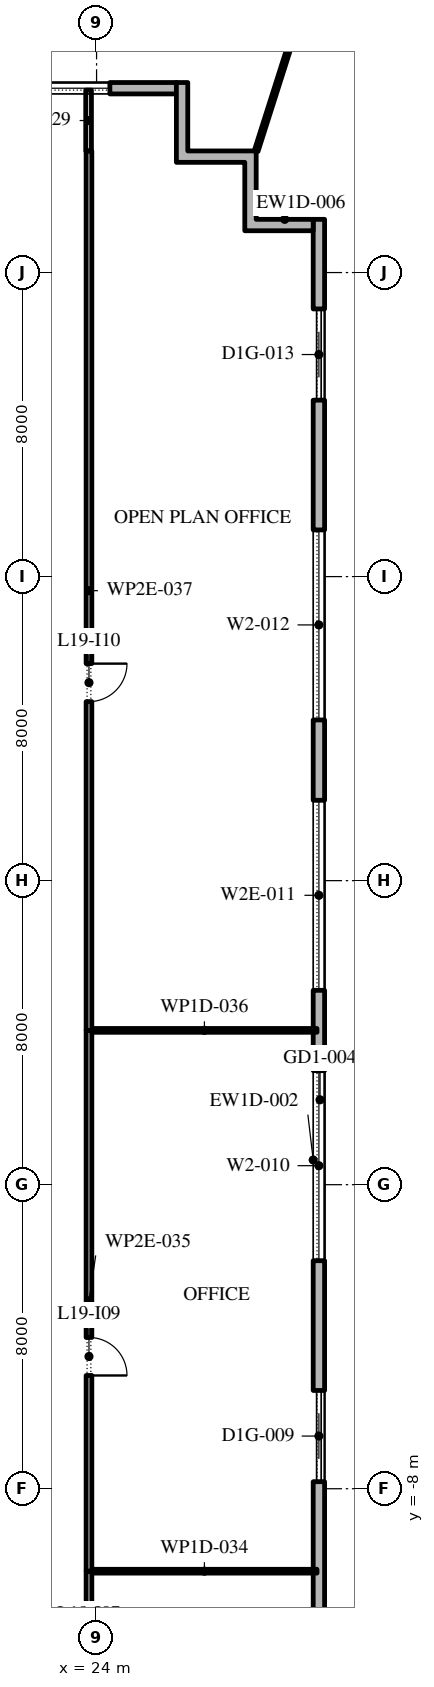
"""IFC4 building model, lengths in metres.
Left out: names, types, materials, properties, quantities, classifications, styles, units other than length and angle.
Written with IfcOpenShell. Run it as: python <this file> out.ifc"""

import sys

from ifc_helpers import new_model, si_unit, direction, frame, frame_2d, origin, place, context, subcontext, project, spatial, polyline, rectangle, outline, extrude, element, fill, save


model = new_model("IFC4")
c1 = context("Model", 3, precision=1e-05, world=origin(), true_north=direction((0.0, 1.0)))
c2 = subcontext(c1, "Body", "Model", "MODEL_VIEW")
j1 = project(units=[si_unit("LENGTHUNIT", "METRE"), si_unit("PLANEANGLEUNIT", "RADIAN")], contexts=[c1])
p1 = place(None, origin())
s1 = spatial("IfcSite", under=j1, at=p1, CompositionType="ELEMENT")
p2 = place(p1, origin())
s2 = spatial("IfcBuilding", under=s1, at=p2, CompositionType="ELEMENT")
p3 = place(p2, frame((0.0, 0.0, 90.0)))
s3 = spatial("IfcBuildingStorey", under=s2, at=p3, CompositionType="ELEMENT", Elevation=90.0)
p4 = place(p3, frame((29.85, -24.1, 0.0), z_axis=(0.0, 0.0, 1.0), x_axis=(0.0, 1.0, 0.0)))
e1 = element("IfcWall", 1, at=p4, inside=s3, PredefinedType="STANDARD", context=c2, shape_type="SweptSolid", body=[
    extrude(rectangle(XDim=49.5, YDim=0.3, at=frame_2d((24.75, 0.0))), origin(), (0.0, 0.0, 1.0), 3.9),
])
p5 = place(p4, frame((0.907, 0.0, 0.45)))
e2 = element("IfcOpeningElement", 2, at=p5, cuts=e1, PredefinedType="OPENING", context=c2, shape_type="SweptSolid", body=[
    extrude(rectangle(XDim=5.0, YDim=3.25, at=frame_2d((2.5, 1.625))), frame((0.0, 0.16, 0.0), z_axis=(0.0, -1.0, 0.0), x_axis=(1.0, 0.0, 0.0)), (0.0, 0.0, 1.0), 0.32),
])
p6 = place(p4, frame((7.871, 0.0, 0.45)))
e3 = element("IfcOpeningElement", 3, at=p6, cuts=e1, PredefinedType="OPENING", context=c2, shape_type="SweptSolid", body=[
    extrude(rectangle(XDim=5.0, YDim=2.725, at=frame_2d((2.5, 1.363))), frame((0.0, 0.16, 0.0), z_axis=(0.0, -1.0, 0.0), x_axis=(1.0, 0.0, 0.0)), (0.0, 0.0, 1.0), 0.32),
])
p7 = place(p4, frame((16.286, 0.0, 0.0)))
e4 = element("IfcOpeningElement", 4, at=p7, cuts=e1, PredefinedType="OPENING", context=c2, shape_type="SweptSolid", body=[
    extrude(rectangle(XDim=2.4, YDim=3.225, at=frame_2d((1.2, 1.613))), frame((0.0, 0.16, 0.0), z_axis=(0.0, -1.0, 0.0), x_axis=(1.0, 0.0, 0.0)), (0.0, 0.0, 1.0), 0.32),
])
p8 = place(p4, frame((22.1, 0.0, 0.45)))
e5 = element("IfcOpeningElement", 5, at=p8, cuts=e1, PredefinedType="OPENING", context=c2, shape_type="SweptSolid", body=[
    extrude(rectangle(XDim=5.0, YDim=3.25, at=frame_2d((2.5, 1.625))), frame((0.0, 0.16, 0.0), z_axis=(0.0, -1.0, 0.0), x_axis=(1.0, 0.0, 0.0)), (0.0, 0.0, 1.0), 0.32),
])
p9 = place(p4, frame((29.214, 0.0, 0.45)))
e6 = element("IfcOpeningElement", 6, at=p9, cuts=e1, PredefinedType="OPENING", context=c2, shape_type="SweptSolid", body=[
    extrude(rectangle(XDim=5.0, YDim=2.775, at=frame_2d((2.5, 1.387))), frame((0.0, 0.16, 0.0), z_axis=(0.0, -1.0, 0.0), x_axis=(1.0, 0.0, 0.0)), (0.0, 0.0, 1.0), 0.32),
])
p10 = place(p4, frame((36.329, 0.0, 0.45)))
e7 = element("IfcOpeningElement", 7, at=p10, cuts=e1, PredefinedType="OPENING", context=c2, shape_type="SweptSolid", body=[
    extrude(rectangle(XDim=5.0, YDim=3.25, at=frame_2d((2.5, 1.625))), frame((0.0, 0.16, 0.0), z_axis=(0.0, -1.0, 0.0), x_axis=(1.0, 0.0, 0.0)), (0.0, 0.0, 1.0), 0.32),
])
p11 = place(p4, frame((44.743, 0.0, 0.0)))
e8 = element("IfcOpeningElement", 8, at=p11, cuts=e1, PredefinedType="OPENING", context=c2, shape_type="SweptSolid", body=[
    extrude(rectangle(XDim=2.4, YDim=3.225, at=frame_2d((1.2, 1.613))), frame((0.0, 0.16, 0.0), z_axis=(0.0, -1.0, 0.0), x_axis=(1.0, 0.0, 0.0)), (0.0, 0.0, 1.0), 0.32),
])
p12 = place(p3, frame((26.1, 28.85, 0.0), z_axis=(0.0, 0.0, 1.0), x_axis=(-1.0, 0.0, 0.0)))
e9 = element("IfcWall", 9, at=p12, inside=s3, PredefinedType="STANDARD", context=c2, shape_type="SweptSolid", body=[
    extrude(rectangle(XDim=52.5, YDim=0.3, at=frame_2d((26.25, 0.0))), origin(), (0.0, 0.0, 1.0), 3.9),
])
p13 = place(p12, frame((1.75, 0.0, 0.45)))
e10 = element("IfcOpeningElement", 10, at=p13, cuts=e9, PredefinedType="OPENING", context=c2, shape_type="SweptSolid", body=[
    extrude(rectangle(XDim=5.0, YDim=2.775, at=frame_2d((2.5, 1.387))), frame((0.0, 0.16, 0.0), z_axis=(0.0, -1.0, 0.0), x_axis=(1.0, 0.0, 0.0)), (0.0, 0.0, 1.0), 0.32),
])
p14 = place(p12, frame((10.4, 0.0, 0.45)))
e11 = element("IfcOpeningElement", 11, at=p14, cuts=e9, PredefinedType="OPENING", context=c2, shape_type="SweptSolid", body=[
    extrude(rectangle(XDim=5.0, YDim=2.775, at=frame_2d((2.5, 1.387))), frame((0.0, 0.16, 0.0), z_axis=(0.0, -1.0, 0.0), x_axis=(1.0, 0.0, 0.0)), (0.0, 0.0, 1.0), 0.32),
])
p15 = place(p12, frame((20.5, 0.0, 0.0)))
e12 = element("IfcOpeningElement", 12, at=p15, cuts=e9, PredefinedType="OPENING", context=c2, shape_type="SweptSolid", body=[
    extrude(rectangle(XDim=2.4, YDim=3.5, at=frame_2d((1.2, 1.75))), frame((0.0, 0.16, 0.0), z_axis=(0.0, -1.0, 0.0), x_axis=(1.0, 0.0, 0.0)), (0.0, 0.0, 1.0), 0.32),
])
p16 = place(p12, frame((28.0, 0.0, 0.45)))
e13 = element("IfcOpeningElement", 13, at=p16, cuts=e9, PredefinedType="OPENING", context=c2, shape_type="SweptSolid", body=[
    extrude(rectangle(XDim=5.0, YDim=2.775, at=frame_2d((2.5, 1.387))), frame((0.0, 0.16, 0.0), z_axis=(0.0, -1.0, 0.0), x_axis=(1.0, 0.0, 0.0)), (0.0, 0.0, 1.0), 0.32),
])
p17 = place(p12, frame((36.8, 0.0, 0.45)))
e14 = element("IfcOpeningElement", 14, at=p17, cuts=e9, PredefinedType="OPENING", context=c2, shape_type="SweptSolid", body=[
    extrude(rectangle(XDim=5.0, YDim=2.775, at=frame_2d((2.5, 1.387))), frame((0.0, 0.16, 0.0), z_axis=(0.0, -1.0, 0.0), x_axis=(1.0, 0.0, 0.0)), (0.0, 0.0, 1.0), 0.32),
])
p18 = place(p12, frame((45.6, 0.0, 0.45)))
e15 = element("IfcOpeningElement", 15, at=p18, cuts=e9, PredefinedType="OPENING", context=c2, shape_type="SweptSolid", body=[
    extrude(rectangle(XDim=5.0, YDim=2.775, at=frame_2d((2.5, 1.387))), frame((0.0, 0.16, 0.0), z_axis=(0.0, -1.0, 0.0), x_axis=(1.0, 0.0, 0.0)), (0.0, 0.0, 1.0), 0.32),
])
p19 = place(p3, origin())
e16 = element("IfcWall", 16, at=p19, inside=s3, PredefinedType="STANDARD", context=c2, shape_type="SweptSolid", body=[
    extrude(outline(polyline([(27.9, 26.9), (26.1, 26.9), (26.1, 29.0), (26.4, 29.0), (26.4, 27.2), (28.2, 27.2), (28.2, 25.4), (29.7, 25.4), (29.7, 25.1), (27.9, 25.1), (27.9, 26.9)])), origin(), (0.0, 0.0, 1.0), 3.9),
])
p20 = place(p3, frame((28.2, 27.2, -0.05), z_axis=(0.0, 0.0, 1.0), x_axis=(0.303785653439, 0.952740403659, 0.0)))
e17 = element("IfcWall", 17, at=p20, inside=s3, PredefinedType="STANDARD", context=c2, shape_type="SweptSolid", body=[
    extrude(rectangle(XDim=6.891, YDim=0.1, at=frame_2d((3.445, 0.0))), origin(), (0.0, 0.0, 1.0), 3.95),
])
p21 = place(p3, frame((23.79, 28.8, 0.0), z_axis=(0.0, 0.0, 1.0), x_axis=(0.0, -1.0, 0.0)))
e18 = element("IfcWall", 18, at=p21, inside=s3, PredefinedType="PARTITIONING", context=c2, shape_type="SweptSolid", body=[
    extrude(rectangle(XDim=1.6, YDim=0.15, at=frame_2d((0.8, 0.0))), origin(), (0.0, 0.0, 1.0), 3.9),
])
p22 = place(p3, frame((23.8, -10.17, 0.0), z_axis=(0.0, 0.0, 1.0), x_axis=(0.0, -1.0, 0.0)))
e19 = element("IfcWall", 19, at=p22, inside=s3, PredefinedType="PARTITIONING", context=c2, shape_type="SweptSolid", body=[
    extrude(rectangle(XDim=7.12, YDim=0.15, at=frame_2d((3.56, 0.0))), origin(), (0.0, 0.0, 1.0), 3.9),
])
p23 = place(p22, frame((1.72, 0.0, 0.0)))
e20 = element("IfcOpeningElement", 20, at=p23, cuts=e19, PredefinedType="OPENING", context=c2, shape_type="SweptSolid", body=[
    extrude(rectangle(XDim=1.0, YDim=2.1, at=frame_2d((0.5, 1.05))), frame((0.0, 0.085, 0.0), z_axis=(0.0, -1.0, 0.0), x_axis=(1.0, 0.0, 0.0)), (0.0, 0.0, 1.0), 0.17),
])
p24 = place(p3, frame((23.875, -10.17, 0.0), z_axis=(0.0, 0.0, 1.0), x_axis=(1.0, 0.0, 0.0)))
e21 = element("IfcWall", 21, at=p24, inside=s3, PredefinedType="PARTITIONING", context=c2, shape_type="SweptSolid", body=[
    extrude(rectangle(XDim=5.925, YDim=0.1, at=frame_2d((2.962, 0.0))), origin(), (0.0, 0.0, 1.0), 3.9),
])
p25 = place(p3, frame((23.8, 4.06, 0.0), z_axis=(0.0, 0.0, 1.0), x_axis=(0.0, -1.0, 0.0)))
e22 = element("IfcWall", 22, at=p25, inside=s3, PredefinedType="PARTITIONING", context=c2, shape_type="SweptSolid", body=[
    extrude(rectangle(XDim=14.23, YDim=0.15, at=frame_2d((7.115, 0.0))), origin(), (0.0, 0.0, 1.0), 3.9),
])
p26 = place(p25, frame((8.08, 0.0, 0.0)))
e23 = element("IfcOpeningElement", 23, at=p26, cuts=e22, PredefinedType="OPENING", context=c2, shape_type="SweptSolid", body=[
    extrude(rectangle(XDim=1.0, YDim=2.1, at=frame_2d((0.5, 1.05))), frame((0.0, 0.085, 0.0), z_axis=(0.0, -1.0, 0.0), x_axis=(1.0, 0.0, 0.0)), (0.0, 0.0, 1.0), 0.17),
])
p27 = place(p3, frame((23.875, 4.06, 0.0), z_axis=(0.0, 0.0, 1.0), x_axis=(1.0, 0.0, 0.0)))
e24 = element("IfcWall", 24, at=p27, inside=s3, PredefinedType="PARTITIONING", context=c2, shape_type="SweptSolid", body=[
    extrude(rectangle(XDim=5.925, YDim=0.1, at=frame_2d((2.962, 0.0))), origin(), (0.0, 0.0, 1.0), 3.9),
])
p28 = place(p3, frame((23.8, 27.2, 0.0), z_axis=(0.0, 0.0, 1.0), x_axis=(0.0, -1.0, 0.0)))
e25 = element("IfcWall", 25, at=p28, inside=s3, PredefinedType="PARTITIONING", context=c2, shape_type="SweptSolid", body=[
    extrude(rectangle(XDim=23.14, YDim=0.15, at=frame_2d((11.57, 0.0))), origin(), (0.0, 0.0, 1.0), 3.9),
])
p29 = place(p28, frame((13.49, 0.0, 0.0)))
e26 = element("IfcOpeningElement", 26, at=p29, cuts=e25, PredefinedType="OPENING", context=c2, shape_type="SweptSolid", body=[
    extrude(rectangle(XDim=1.0, YDim=2.1, at=frame_2d((0.5, 1.05))), frame((0.0, 0.085, 0.0), z_axis=(0.0, -1.0, 0.0), x_axis=(1.0, 0.0, 0.0)), (0.0, 0.0, 1.0), 0.17),
])
p30 = place(p7, origin())
e27 = element("IfcDoor", 27, at=p30, inside=s3, OperationType="DOUBLE_DOOR_SLIDING", PredefinedType="DOOR", context=c2, shape_type="SweptSolid", body=[
    extrude(rectangle(XDim=2.4, YDim=3.225, at=frame_2d((1.2, 1.613))), frame((0.0, 0.025, 0.0), z_axis=(0.0, -1.0, 0.0), x_axis=(1.0, 0.0, 0.0)), (0.0, 0.0, 1.0), 0.05),
])
fill(e4, e27)
p31 = place(p8, origin())
e28 = element("IfcWindow", 28, at=p31, inside=s3, PartitioningType="DOUBLE_PANEL_VERTICAL", PredefinedType="WINDOW", context=c2, shape_type="SweptSolid", body=[
    extrude(rectangle(XDim=5.0, YDim=3.25, at=frame_2d((2.5, 1.625))), frame((0.0, 0.03, 0.0), z_axis=(0.0, -1.0, 0.0), x_axis=(1.0, 0.0, 0.0)), (0.0, 0.0, 1.0), 0.06),
])
fill(e5, e28)
p32 = place(p9, origin())
e29 = element("IfcWindow", 29, at=p32, inside=s3, PartitioningType="DOUBLE_PANEL_VERTICAL", PredefinedType="WINDOW", context=c2, shape_type="SweptSolid", body=[
    extrude(rectangle(XDim=5.0, YDim=2.775, at=frame_2d((2.5, 1.387))), frame((0.0, 0.03, 0.0), z_axis=(0.0, -1.0, 0.0), x_axis=(1.0, 0.0, 0.0)), (0.0, 0.0, 1.0), 0.06),
])
fill(e6, e29)
p33 = place(p10, origin())
e30 = element("IfcWindow", 30, at=p33, inside=s3, PartitioningType="DOUBLE_PANEL_VERTICAL", PredefinedType="WINDOW", context=c2, shape_type="SweptSolid", body=[
    extrude(rectangle(XDim=5.0, YDim=3.25, at=frame_2d((2.5, 1.625))), frame((0.0, 0.03, 0.0), z_axis=(0.0, -1.0, 0.0), x_axis=(1.0, 0.0, 0.0)), (0.0, 0.0, 1.0), 0.06),
])
fill(e7, e30)
p34 = place(p11, origin())
e31 = element("IfcDoor", 31, at=p34, inside=s3, OperationType="DOUBLE_DOOR_SLIDING", PredefinedType="DOOR", context=c2, shape_type="SweptSolid", body=[
    extrude(rectangle(XDim=2.4, YDim=3.225, at=frame_2d((1.2, 1.613))), frame((0.0, 0.025, 0.0), z_axis=(0.0, -1.0, 0.0), x_axis=(1.0, 0.0, 0.0)), (0.0, 0.0, 1.0), 0.05),
])
fill(e8, e31)
p35 = place(p13, origin())
e32 = element("IfcWindow", 32, at=p35, inside=s3, PartitioningType="DOUBLE_PANEL_VERTICAL", PredefinedType="WINDOW", context=c2, shape_type="SweptSolid", body=[
    extrude(rectangle(XDim=5.0, YDim=2.775, at=frame_2d((2.5, 1.387))), frame((0.0, 0.03, 0.0), z_axis=(0.0, -1.0, 0.0), x_axis=(1.0, 0.0, 0.0)), (0.0, 0.0, 1.0), 0.06),
])
fill(e10, e32)
p36 = place(p26, origin())
e33 = element("IfcDoor", 33, at=p36, inside=s3, OperationType="SINGLE_SWING_LEFT", PredefinedType="DOOR", context=c2, shape_type="SweptSolid", body=[
    extrude(rectangle(XDim=1.0, YDim=2.1, at=frame_2d((0.5, 1.05))), frame((0.0, 0.025, 0.0), z_axis=(0.0, -1.0, 0.0), x_axis=(1.0, 0.0, 0.0)), (0.0, 0.0, 1.0), 0.05),
])
fill(e23, e33)
p37 = place(p29, origin())
e34 = element("IfcDoor", 34, at=p37, inside=s3, OperationType="SINGLE_SWING_RIGHT", PredefinedType="DOOR", context=c2, shape_type="SweptSolid", body=[
    extrude(rectangle(XDim=1.0, YDim=2.1, at=frame_2d((0.5, 1.05))), frame((0.0, 0.025, 0.0), z_axis=(0.0, -1.0, 0.0), x_axis=(1.0, 0.0, 0.0)), (0.0, 0.0, 1.0), 0.05),
])
fill(e26, e34)
save(model, sys.argv[1])
